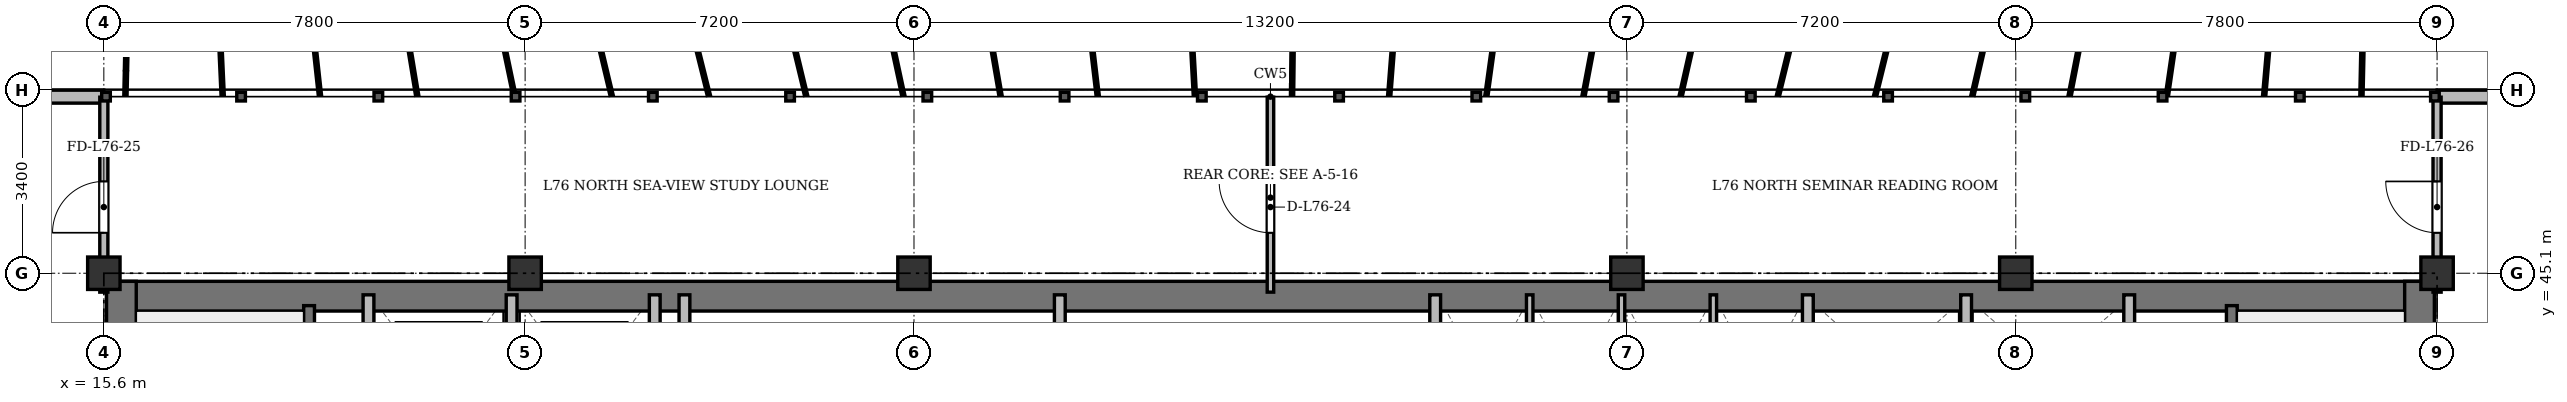
"""IFC4 building model, lengths in metres.
Left out: names, types, materials, properties, quantities, classifications, styles, units other than length and angle.
Written with IfcOpenShell. Run it as: python <this file> out.ifc"""

import sys

from ifc_helpers import new_model, si_unit, direction, frame, frame_2d, origin, origin_2d, place, context, subcontext, project, spatial, rectangle, extrude, source, transform, mapped, element, fill, save


model = new_model("IFC4")
c1 = context("Model", 3, precision=1e-05, world=origin(), true_north=direction((0.0, 1.0)))
c2 = subcontext(c1, "Body", "Model", "MODEL_VIEW")
j1 = project(units=[si_unit("LENGTHUNIT", "METRE"), si_unit("PLANEANGLEUNIT", "RADIAN")], contexts=[c1])
p1 = place(None, origin())
s1 = spatial("IfcSite", under=j1, at=p1, CompositionType="ELEMENT")
p2 = place(p1, origin())
s2 = spatial("IfcBuilding", under=s1, at=p2, CompositionType="ELEMENT")
p3 = place(p2, frame((0.0, 0.0, 291.9)))
s3 = spatial("IfcBuildingStorey", under=s2, at=p3, CompositionType="ELEMENT", Elevation=291.9)
m1 = source(origin(), c2, "Body", "SweptSolid", [
    extrude(rectangle(XDim=0.6, YDim=0.6, at=origin_2d()), origin(), (0.0, 0.0, 1.0), 3.6),
])
for number, where, z_axis, x_axis in (
    (1, (15.6, 45.1, 0.0), (0.0, 0.0, 1.0), (1.0, 0.0, 0.0)),
    (2, (23.4, 45.1, 0.0), (0.0, 0.0, 1.0), (1.0, 0.0, 0.0)),
    (3, (30.6, 45.1, 0.0), (0.0, 0.0, 1.0), (1.0, 0.0, 0.0)),
    (4, (43.8, 45.1, 0.0), (0.0, 0.0, 1.0), (1.0, 0.0, 0.0)),
    (5, (51.0, 45.1, 0.0), (0.0, 0.0, 1.0), (1.0, 0.0, 0.0)),
    (6, (58.8, 45.1, 0.0), (0.0, 0.0, 1.0), (1.0, 0.0, 0.0)),
):
    element("IfcColumn", number, at=place(p3, frame(where, z_axis=z_axis, x_axis=x_axis)), inside=s3, PredefinedType="COLUMN", context=c2, shape_type="MappedRepresentation", body=[
        mapped(m1, transform((0.0, 0.0, 0.0), x_axis=(1.0, 0.0, 0.0), y_axis=(0.0, 1.0, 0.0), z_axis=(0.0, 0.0, 1.0), scale=1.0)),
    ])
p4 = place(p3, frame((11.3, 48.37, 0.0), z_axis=(0.0, 0.0, 1.0), x_axis=(1.0, 0.0, 0.0)))
e7 = element("IfcWall", 7, at=p4, inside=s3, PredefinedType="SOLIDWALL", context=c2, shape_type="SweptSolid", body=[
    extrude(rectangle(XDim=4.3, YDim=0.24, at=frame_2d((2.15, 0.0))), origin(), (0.0, 0.0, 1.0), 3.18),
])
p5 = place(p4, frame((1.46, 0.0, 0.9)))
e8 = element("IfcOpeningElement", 8, at=p5, cuts=e7, PredefinedType="OPENING", context=c2, shape_type="SweptSolid", body=[
    extrude(rectangle(XDim=1.2, YDim=1.65, at=frame_2d((0.6, 0.825))), frame((0.0, 0.13, 0.0), z_axis=(0.0, -1.0, 0.0), x_axis=(1.0, 0.0, 0.0)), (0.0, 0.0, 1.0), 0.26),
])
p6 = place(p3, frame((58.8, 48.37, 0.0), z_axis=(0.0, 0.0, 1.0), x_axis=(1.0, 0.0, 0.0)))
e9 = element("IfcWall", 9, at=p6, inside=s3, PredefinedType="SOLIDWALL", context=c2, shape_type="SweptSolid", body=[
    extrude(rectangle(XDim=4.3, YDim=0.24, at=frame_2d((2.15, 0.0))), origin(), (0.0, 0.0, 1.0), 3.18),
])
p7 = place(p6, frame((1.46, 0.0, 0.9)))
e10 = element("IfcOpeningElement", 10, at=p7, cuts=e9, PredefinedType="OPENING", context=c2, shape_type="SweptSolid", body=[
    extrude(rectangle(XDim=1.2, YDim=1.65, at=frame_2d((0.6, 0.825))), frame((0.0, 0.13, 0.0), z_axis=(0.0, -1.0, 0.0), x_axis=(1.0, 0.0, 0.0)), (0.0, 0.0, 1.0), 0.26),
])
p8 = place(p3, frame((15.65, 44.675, 0.0), z_axis=(0.0, 0.0, 1.0), x_axis=(1.0, 0.0, 0.0)))
e11 = element("IfcWall", 11, at=p8, inside=s3, PredefinedType="SHEAR", context=c2, shape_type="SweptSolid", body=[
    extrude(rectangle(XDim=43.1, YDim=0.55, at=frame_2d((21.55, 0.0))), origin(), (0.0, 0.0, 1.0), 3.18),
])
for number, where, z_axis, x_axis in (
    (12, (15.925, 33.4, 0.0), (0.0, 0.0, 1.0), (0.0, 1.0, 0.0)),
    (13, (58.475, 33.4, 0.0), (0.0, 0.0, 1.0), (0.0, 1.0, 0.0)),
):
    element("IfcWall", number, at=place(p3, frame(where, z_axis=z_axis, x_axis=x_axis)), inside=s3, PredefinedType="SHEAR", context=c2, shape_type="SweptSolid", body=[
        extrude(rectangle(XDim=11.55, YDim=0.55, at=frame_2d((5.775, 0.0))), origin(), (0.0, 0.0, 1.0), 3.18),
    ])
p9 = place(p3, frame((19.4, 33.4, 0.0), z_axis=(0.0, 0.0, 1.0), x_axis=(0.0, 1.0, 0.0)))
e14 = element("IfcWall", 14, at=p9, inside=s3, PredefinedType="SHEAR", context=c2, shape_type="SweptSolid", body=[
    extrude(rectangle(XDim=11.1, YDim=0.2, at=frame_2d((5.55, 0.0))), origin(), (0.0, 0.0, 1.0), 3.18),
])
p10 = place(p9, frame((0.85, 0.0, 0.0)))
e15 = element("IfcOpeningElement", 15, at=p10, cuts=e14, PredefinedType="OPENING", context=c2, shape_type="SweptSolid", body=[
    extrude(rectangle(XDim=1.1, YDim=2.15, at=frame_2d((0.55, 1.075))), frame((0.0, 0.11, 0.0), z_axis=(0.0, -1.0, 0.0), x_axis=(1.0, 0.0, 0.0)), (0.0, 0.0, 1.0), 0.22),
])
p11 = place(p3, frame((55.0, 33.4, 0.0), z_axis=(0.0, 0.0, 1.0), x_axis=(0.0, 1.0, 0.0)))
e16 = element("IfcWall", 16, at=p11, inside=s3, PredefinedType="SHEAR", context=c2, shape_type="SweptSolid", body=[
    extrude(rectangle(XDim=11.1, YDim=0.2, at=frame_2d((5.55, 0.0))), origin(), (0.0, 0.0, 1.0), 3.18),
])
p12 = place(p11, frame((0.85, 0.0, 0.0)))
e17 = element("IfcOpeningElement", 17, at=p12, cuts=e16, PredefinedType="OPENING", context=c2, shape_type="SweptSolid", body=[
    extrude(rectangle(XDim=1.1, YDim=2.15, at=frame_2d((0.55, 1.075))), frame((0.0, 0.11, 0.0), z_axis=(0.0, -1.0, 0.0), x_axis=(1.0, 0.0, 0.0)), (0.0, 0.0, 1.0), 0.22),
])
for number, where, z_axis, x_axis in (
    (18, (20.5, 41.3, 0.0), (0.0, 0.0, 1.0), (0.0, 1.0, 0.0)),
    (19, (23.15, 41.3, 0.0), (0.0, 0.0, 1.0), (0.0, 1.0, 0.0)),
    (20, (25.8, 41.3, 0.0), (0.0, 0.0, 1.0), (0.0, 1.0, 0.0)),
):
    element("IfcWall", number, at=place(p3, frame(where, z_axis=z_axis, x_axis=x_axis)), inside=s3, PredefinedType="SOLIDWALL", context=c2, shape_type="SweptSolid", body=[
        extrude(rectangle(XDim=3.4, YDim=0.2, at=frame_2d((1.7, 0.0))), origin(), (0.0, 0.0, 1.0), 3.18),
    ])
for number, where, z_axis, x_axis in (
    (21, (26.35, 33.4, 0.0), (0.0, 0.0, 1.0), (0.0, 1.0, 0.0)),
    (22, (33.3, 33.4, 0.0), (0.0, 0.0, 1.0), (0.0, 1.0, 0.0)),
):
    element("IfcWall", number, at=place(p3, frame(where, z_axis=z_axis, x_axis=x_axis)), inside=s3, PredefinedType="SOLIDWALL", context=c2, shape_type="SweptSolid", body=[
        extrude(rectangle(XDim=11.3, YDim=0.2, at=frame_2d((5.65, 0.0))), origin(), (0.0, 0.0, 1.0), 2.73),
    ])
p13 = place(p3, frame((40.25, 41.5, 0.0), z_axis=(0.0, 0.0, 1.0), x_axis=(0.0, 1.0, 0.0)))
e23 = element("IfcWall", 23, at=p13, inside=s3, PredefinedType="SOLIDWALL", context=c2, shape_type="SweptSolid", body=[
    extrude(rectangle(XDim=3.2, YDim=0.2, at=frame_2d((1.6, 0.0))), origin(), (0.0, 0.0, 1.0), 3.18),
])
for number, where, z_axis, x_axis in (
    (24, (42.0, 41.5, 0.0), (0.0, 0.0, 1.0), (0.0, 1.0, 0.0)),
    (25, (43.7, 41.5, 0.0), (0.0, 0.0, 1.0), (0.0, 1.0, 0.0)),
    (26, (45.4, 41.5, 0.0), (0.0, 0.0, 1.0), (0.0, 1.0, 0.0)),
):
    element("IfcWall", number, at=place(p3, frame(where, z_axis=z_axis, x_axis=x_axis)), inside=s3, PredefinedType="PARTITIONING", context=c2, shape_type="SweptSolid", body=[
        extrude(rectangle(XDim=3.2, YDim=0.12, at=frame_2d((1.6, 0.0))), origin(), (0.0, 0.0, 1.0), 3.18),
    ])
p14 = place(p3, frame((47.15, 33.4, 0.0), z_axis=(0.0, 0.0, 1.0), x_axis=(0.0, 1.0, 0.0)))
e27 = element("IfcWall", 27, at=p14, inside=s3, PredefinedType="SOLIDWALL", context=c2, shape_type="SweptSolid", body=[
    extrude(rectangle(XDim=11.3, YDim=0.2, at=frame_2d((5.65, 0.0))), origin(), (0.0, 0.0, 1.0), 2.73),
])
for number, where, z_axis, x_axis in (
    (28, (50.08, 42.05, 0.0), (0.0, 0.0, 1.0), (0.0, 1.0, 0.0)),
    (29, (53.1, 42.05, 0.0), (0.0, 0.0, 1.0), (0.0, 1.0, 0.0)),
):
    element("IfcWall", number, at=place(p3, frame(where, z_axis=z_axis, x_axis=x_axis)), inside=s3, PredefinedType="SOLIDWALL", context=c2, shape_type="SweptSolid", body=[
        extrude(rectangle(XDim=2.65, YDim=0.2, at=frame_2d((1.325, 0.0))), origin(), (0.0, 0.0, 1.0), 3.18),
    ])
p15 = place(p3, frame((37.2, 44.75, 0.0), z_axis=(0.0, 0.0, 1.0), x_axis=(0.0, 1.0, 0.0)))
e30 = element("IfcWall", 30, at=p15, inside=s3, PredefinedType="PARTITIONING", context=c2, shape_type="SweptSolid", body=[
    extrude(rectangle(XDim=3.61, YDim=0.12, at=frame_2d((1.805, 0.0))), origin(), (0.0, 0.0, 1.0), 2.73),
])
p16 = place(p15, frame((1.1, 0.0, 0.0)))
e31 = element("IfcOpeningElement", 31, at=p16, cuts=e30, PredefinedType="OPENING", context=c2, shape_type="SweptSolid", body=[
    extrude(rectangle(XDim=0.95, YDim=2.15, at=frame_2d((0.475, 1.075))), frame((0.0, 0.07, 0.0), z_axis=(0.0, -1.0, 0.0), x_axis=(1.0, 0.0, 0.0)), (0.0, 0.0, 1.0), 0.14),
])
p17 = place(p3, frame((15.6, 44.75, 0.0), z_axis=(0.0, 0.0, 1.0), x_axis=(0.0, 1.0, 0.0)))
e32 = element("IfcWall", 32, at=p17, inside=s3, PredefinedType="PARTITIONING", context=c2, shape_type="SweptSolid", body=[
    extrude(rectangle(XDim=3.61, YDim=0.15, at=frame_2d((1.805, 0.0))), origin(), (0.0, 0.0, 1.0), 2.68),
])
p18 = place(p17, frame((1.1, 0.0, 0.0)))
e33 = element("IfcOpeningElement", 33, at=p18, cuts=e32, PredefinedType="OPENING", context=c2, shape_type="SweptSolid", body=[
    extrude(rectangle(XDim=0.95, YDim=2.15, at=frame_2d((0.475, 1.075))), frame((0.0, 0.085, 0.0), z_axis=(0.0, -1.0, 0.0), x_axis=(1.0, 0.0, 0.0)), (0.0, 0.0, 1.0), 0.17),
])
p19 = place(p3, frame((58.8, 44.75, 0.0), z_axis=(0.0, 0.0, 1.0), x_axis=(0.0, 1.0, 0.0)))
e34 = element("IfcWall", 34, at=p19, inside=s3, PredefinedType="PARTITIONING", context=c2, shape_type="SweptSolid", body=[
    extrude(rectangle(XDim=3.61, YDim=0.15, at=frame_2d((1.805, 0.0))), origin(), (0.0, 0.0, 1.0), 2.68),
])
p20 = place(p19, frame((1.1, 0.0, 0.0)))
e35 = element("IfcOpeningElement", 35, at=p20, cuts=e34, PredefinedType="OPENING", context=c2, shape_type="SweptSolid", body=[
    extrude(rectangle(XDim=0.95, YDim=2.15, at=frame_2d((0.475, 1.075))), frame((0.0, 0.085, 0.0), z_axis=(0.0, -1.0, 0.0), x_axis=(1.0, 0.0, 0.0)), (0.0, 0.0, 1.0), 0.17),
])
m2 = source(origin(), c2, "Body", "SweptSolid", [
    extrude(rectangle(XDim=0.95, YDim=2.15, at=frame_2d((0.475, 1.075))), frame((0.0, 0.025, 0.0), z_axis=(0.0, -1.0, 0.0), x_axis=(1.0, 0.0, 0.0)), (0.0, 0.0, 1.0), 0.05),
])
p21 = place(p16, origin())
e36 = element("IfcDoor", 36, at=p21, inside=s3, OperationType="SINGLE_SWING_RIGHT", PredefinedType="DOOR", context=c2, shape_type="MappedRepresentation", body=[
    mapped(m2, transform((0.0, 0.0, 0.0), x_axis=(1.0, 0.0, 0.0), y_axis=(0.0, 1.0, 0.0), z_axis=(0.0, 0.0, 1.0), scale=1.0)),
])
fill(e31, e36)
p22 = place(p18, origin())
e37 = element("IfcDoor", 37, at=p22, inside=s3, OperationType="SINGLE_SWING_LEFT", PredefinedType="DOOR", context=c2, shape_type="MappedRepresentation", body=[
    mapped(m2, transform((0.0, 0.0, 0.0), x_axis=(1.0, 0.0, 0.0), y_axis=(0.0, 1.0, 0.0), z_axis=(0.0, 0.0, 1.0), scale=1.0)),
])
fill(e33, e37)
p23 = place(p20, origin())
e38 = element("IfcDoor", 38, at=p23, inside=s3, OperationType="SINGLE_SWING_RIGHT", PredefinedType="DOOR", context=c2, shape_type="MappedRepresentation", body=[
    mapped(m2, transform((0.0, 0.0, 0.0), x_axis=(1.0, 0.0, 0.0), y_axis=(0.0, 1.0, 0.0), z_axis=(0.0, 0.0, 1.0), scale=1.0)),
])
fill(e35, e38)
save(model, sys.argv[1])
